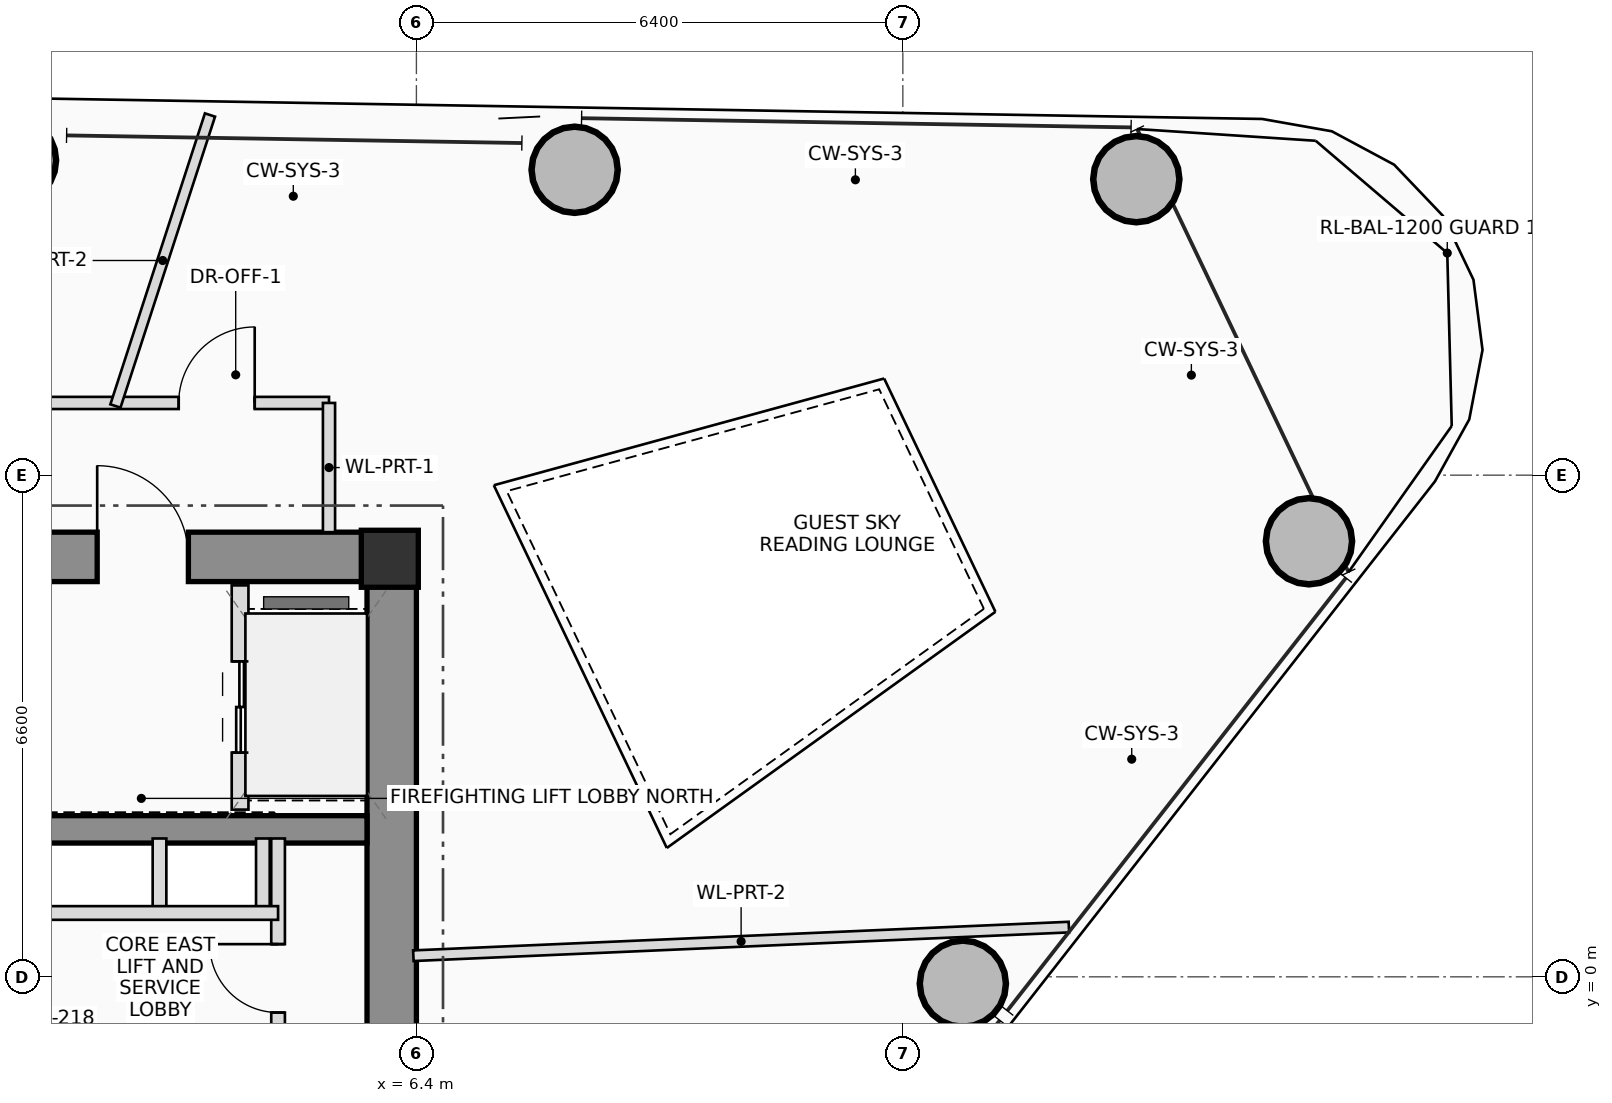
"""IFC4 building model, lengths in metres.
Left out: names, types, materials, properties, quantities, classifications, styles, units other than length and angle.
Written with IfcOpenShell. Run it as: python <this file> out.ifc"""

import sys

from ifc_helpers import new_model, si_unit, direction, frame, frame_2d, origin, origin_2d, place, context, subcontext, project, spatial, rectangle, hollow_circle, extrude, source, transform, mapped, element, fill, save


model = new_model("IFC4")
c1 = context("Model", 3, precision=1e-05, world=origin(), true_north=direction((0.0, 1.0)))
c2 = subcontext(c1, "Body", "Model", "MODEL_VIEW")
j1 = project(units=[si_unit("LENGTHUNIT", "METRE"), si_unit("PLANEANGLEUNIT", "RADIAN")], contexts=[c1])
p1 = place(None, origin())
s1 = spatial("IfcSite", under=j1, at=p1, CompositionType="ELEMENT")
p2 = place(p1, origin())
s2 = spatial("IfcBuilding", under=s1, at=p2, CompositionType="ELEMENT")
p3 = place(p2, frame((0.0, 0.0, 208.7)))
s3 = spatial("IfcBuildingStorey", under=s2, at=p3, CompositionType="ELEMENT", Elevation=208.7)
m1 = source(origin(), c2, "Body", "SweptSolid", [
    extrude(rectangle(XDim=0.75, YDim=0.75, at=origin_2d()), origin(), (0.0, 0.0, 1.0), 3.45),
])
p4 = place(p3, frame((6.05, 5.5, 0.0), z_axis=(0.0, 0.0, 1.0), x_axis=(1.0, 0.0, 0.0)))
e1 = element("IfcColumn", 1, at=p4, inside=s3, PredefinedType="COLUMN", context=c2, shape_type="MappedRepresentation", body=[
    mapped(m1, transform((0.0, 0.0, 0.0), scale=1.0)),
])
p5 = place(p3, frame((-6.4, 5.525, 0.0), z_axis=(0.0, 0.0, 1.0), x_axis=(1.0, 0.0, 0.0)))
e2 = element("IfcWall", 2, at=p5, inside=s3, PredefinedType="SHEAR", context=c2, shape_type="SweptSolid", body=[
    extrude(rectangle(XDim=12.8, YDim=0.65, at=frame_2d((6.4, 0.0))), origin(), (0.0, 0.0, 1.0), 3.45),
])
p6 = place(p5, frame((8.6, 0.0, 0.0)))
e3 = element("IfcOpeningElement", 3, at=p6, cuts=e2, PredefinedType="OPENING", context=c2, shape_type="SweptSolid", body=[
    extrude(rectangle(XDim=1.2, YDim=2.2, at=frame_2d((0.6, 1.1))), frame((0.0, 0.335, 0.0), z_axis=(0.0, -1.0, 0.0), x_axis=(1.0, 0.0, 0.0)), (0.0, 0.0, 1.0), 0.67),
])
p7 = place(p3, frame((6.075, -5.2, 0.0), z_axis=(0.0, 0.0, 1.0), x_axis=(0.0, 1.0, 0.0)))
e4 = element("IfcWall", 4, at=p7, inside=s3, PredefinedType="SHEAR", context=c2, shape_type="SweptSolid", body=[
    extrude(rectangle(XDim=10.4, YDim=0.65, at=frame_2d((5.2, 0.0))), origin(), (0.0, 0.0, 1.0), 3.45),
])
p8 = place(p3, frame((-5.75, 1.94, 0.0), z_axis=(0.0, 0.0, 1.0), x_axis=(1.0, 0.0, 0.0)))
e5 = element("IfcWall", 5, at=p8, inside=s3, PredefinedType="SHEAR", context=c2, shape_type="SweptSolid", body=[
    extrude(rectangle(XDim=11.5, YDim=0.36, at=frame_2d((5.75, 0.0))), origin(), (0.0, 0.0, 1.0), 3.45),
])
m2 = source(origin(), c2, "Body", "SweptSolid", [
    extrude(hollow_circle(Radius=0.575, WallThickness=0.042, at=origin_2d()), origin(), (0.0, 0.0, 1.0), 3.45),
])
for number, where, z_axis, x_axis in (
    (6, (13.59, -0.09, 0.0), (0.0, 0.0, 1.0), (1.0, 0.0, 0.0)),
    (7, (18.144, 5.731, 0.0), (0.0, 0.0, 1.0), (1.0, 0.0, 0.0)),
    (8, (15.872, 10.494, 0.0), (0.0, 0.0, 1.0), (1.0, 0.0, 0.0)),
    (9, (8.482, 10.618, 0.0), (0.0, 0.0, 1.0), (1.0, 0.0, 0.0)),
    (10, (1.092, 10.742, 0.0), (0.0, 0.0, 1.0), (1.0, 0.0, 0.0)),
):
    element("IfcColumn", number, at=place(p3, frame(where, z_axis=z_axis, x_axis=x_axis)), inside=s3, PredefinedType="COLUMN", context=c2, shape_type="MappedRepresentation", body=[
        mapped(m2, transform((0.0, 0.0, 0.0), scale=1.0)),
    ])
p9 = place(p3, frame((4.08, 2.2, 0.0), z_axis=(0.0, 0.0, 1.0), x_axis=(0.0, 1.0, 0.0)))
e11 = element("IfcWall", 11, at=p9, inside=s3, PredefinedType="PLUMBINGWALL", context=c2, shape_type="SweptSolid", body=[
    extrude(rectangle(XDim=2.95, YDim=0.22, at=frame_2d((1.475, 0.0))), origin(), (0.0, 0.0, 1.0), 3.25),
])
p10 = place(p9, frame((0.75, 0.0, 0.0)))
e12 = element("IfcOpeningElement", 12, at=p10, cuts=e11, PredefinedType="OPENING", context=c2, shape_type="SweptSolid", body=[
    extrude(rectangle(XDim=1.2, YDim=2.25, at=frame_2d((0.6, 1.125))), frame((0.0, 0.12, 0.0), z_axis=(0.0, -1.0, 0.0), x_axis=(1.0, 0.0, 0.0)), (0.0, 0.0, 1.0), 0.24),
])
for number, where, z_axis, x_axis in (
    (13, (3.02, 0.84, 0.0), (0.0, 0.0, 1.0), (0.0, 1.0, 0.0)),
    (14, (4.38, 0.84, 0.0), (0.0, 0.0, 1.0), (0.0, 1.0, 0.0)),
):
    element("IfcWall", number, at=place(p3, frame(where, z_axis=z_axis, x_axis=x_axis)), inside=s3, PredefinedType="PLUMBINGWALL", context=c2, shape_type="SweptSolid", body=[
        extrude(rectangle(XDim=0.98, YDim=0.18, at=frame_2d((0.49, 0.0))), origin(), (0.0, 0.0, 1.0), 3.25),
    ])
p11 = place(p3, frame((4.58, -1.82, 0.0), z_axis=(0.0, 0.0, 1.0), x_axis=(0.0, 1.0, 0.0)))
e15 = element("IfcWall", 15, at=p11, inside=s3, PredefinedType="PLUMBINGWALL", context=c2, shape_type="SweptSolid", body=[
    extrude(rectangle(XDim=3.64, YDim=0.18, at=frame_2d((1.82, 0.0))), origin(), (0.0, 0.0, 1.0), 3.25),
])
p12 = place(p11, frame((1.35, 0.0, 0.0)))
e16 = element("IfcOpeningElement", 16, at=p12, cuts=e15, PredefinedType="OPENING", context=c2, shape_type="SweptSolid", body=[
    extrude(rectangle(XDim=0.9, YDim=2.05, at=frame_2d((0.45, 1.025))), frame((0.0, 0.1, 0.0), z_axis=(0.0, -1.0, 0.0), x_axis=(1.0, 0.0, 0.0)), (0.0, 0.0, 1.0), 0.2),
])
p13 = place(p3, frame((-5.68, 0.84, 0.0), z_axis=(0.0, 0.0, 1.0), x_axis=(1.0, 0.0, 0.0)))
e17 = element("IfcWall", 17, at=p13, inside=s3, PredefinedType="PLUMBINGWALL", context=c2, shape_type="SweptSolid", body=[
    extrude(rectangle(XDim=10.26, YDim=0.18, at=frame_2d((5.13, 0.0))), origin(), (0.0, 0.0, 1.0), 3.25),
])
p14 = place(p13, frame((1.08, 0.0, 0.0)))
e18 = element("IfcOpeningElement", 18, at=p14, cuts=e17, PredefinedType="OPENING", context=c2, shape_type="SweptSolid", body=[
    extrude(rectangle(XDim=0.9, YDim=2.05, at=frame_2d((0.45, 1.025))), frame((0.0, 0.1, 0.0), z_axis=(0.0, -1.0, 0.0), x_axis=(1.0, 0.0, 0.0)), (0.0, 0.0, 1.0), 0.2),
])
p15 = place(p13, frame((3.93, 0.0, 0.0)))
e19 = element("IfcOpeningElement", 19, at=p15, cuts=e17, PredefinedType="OPENING", context=c2, shape_type="SweptSolid", body=[
    extrude(rectangle(XDim=1.1, YDim=2.2, at=frame_2d((0.55, 1.1))), frame((0.0, 0.1, 0.0), z_axis=(0.0, -1.0, 0.0), x_axis=(1.0, 0.0, 0.0)), (0.0, 0.0, 1.0), 0.2),
])
p16 = place(p13, frame((5.63, 0.0, 0.0)))
e20 = element("IfcOpeningElement", 20, at=p16, cuts=e17, PredefinedType="OPENING", context=c2, shape_type="SweptSolid", body=[
    extrude(rectangle(XDim=1.1, YDim=2.2, at=frame_2d((0.55, 1.1))), frame((0.0, 0.1, 0.0), z_axis=(0.0, -1.0, 0.0), x_axis=(1.0, 0.0, 0.0)), (0.0, 0.0, 1.0), 0.2),
])
p17 = place(p3, frame((-6.36, 7.55, 0.0), z_axis=(0.0, 0.0, 1.0), x_axis=(1.0, 0.0, 0.0)))
e21 = element("IfcWall", 21, at=p17, inside=s3, PredefinedType="PARTITIONING", context=c2, shape_type="SweptSolid", body=[
    extrude(rectangle(XDim=11.61, YDim=0.16, at=frame_2d((5.805, 0.0))), origin(), (0.0, 0.0, 1.0), 2.605),
])
p18 = place(p17, frame((5.985, 0.0, 0.0)))
e22 = element("IfcOpeningElement", 22, at=p18, cuts=e21, PredefinedType="OPENING", context=c2, shape_type="SweptSolid", body=[
    extrude(rectangle(XDim=1.0, YDim=2.25, at=frame_2d((0.5, 1.125))), frame((0.0, 0.09, 0.0), z_axis=(0.0, -1.0, 0.0), x_axis=(1.0, 0.0, 0.0)), (0.0, 0.0, 1.0), 0.18),
])
p19 = place(p17, frame((9.633, 0.0, 0.0)))
e23 = element("IfcOpeningElement", 23, at=p19, cuts=e21, PredefinedType="OPENING", context=c2, shape_type="SweptSolid", body=[
    extrude(rectangle(XDim=1.0, YDim=2.25, at=frame_2d((0.5, 1.125))), frame((0.0, 0.09, 0.0), z_axis=(0.0, -1.0, 0.0), x_axis=(1.0, 0.0, 0.0)), (0.0, 0.0, 1.0), 0.18),
])
p20 = place(p3, frame((5.25, 7.55, 0.0), z_axis=(0.0, 0.0, 1.0), x_axis=(0.0, -1.0, 0.0)))
e24 = element("IfcWall", 24, at=p20, inside=s3, PredefinedType="PARTITIONING", context=c2, shape_type="SweptSolid", body=[
    extrude(rectangle(XDim=1.7, YDim=0.16, at=frame_2d((0.85, 0.0))), origin(), (0.0, 0.0, 1.0), 2.605),
])
p21 = place(p3, frame((6.36, 0.278, 0.0), z_axis=(0.0, 0.0, 1.0), x_axis=(0.999047440648, 0.043637270025, 0.0)))
e25 = element("IfcWall", 25, at=p21, inside=s3, PredefinedType="PARTITIONING", context=c2, shape_type="SweptSolid", body=[
    extrude(rectangle(XDim=8.633, YDim=0.14, at=frame_2d((4.316, 0.0))), origin(), (0.0, 0.0, 1.0), 2.605),
])
p22 = place(p3, frame((2.44, 7.51, 0.0), z_axis=(0.0, 0.0, 1.0), x_axis=(0.309013387048, 0.951057688379, 0.0)))
e26 = element("IfcWall", 26, at=p22, inside=s3, PredefinedType="PARTITIONING", context=c2, shape_type="SweptSolid", body=[
    extrude(rectangle(XDim=4.025, YDim=0.14, at=frame_2d((2.013, 0.0))), origin(), (0.0, 0.0, 1.0), 2.605),
])
p23 = place(p6, origin())
e27 = element("IfcDoor", 27, at=p23, inside=s3, OperationType="SINGLE_SWING_LEFT", PredefinedType="DOOR", context=c2, shape_type="SweptSolid", body=[
    extrude(rectangle(XDim=1.2, YDim=2.2, at=frame_2d((0.6, 1.1))), frame((0.0, 0.025, 0.0), z_axis=(0.0, -1.0, 0.0), x_axis=(1.0, 0.0, 0.0)), (0.0, 0.0, 1.0), 0.05),
])
fill(e3, e27)
p24 = place(p10, origin())
e28 = element("IfcDoor", 28, at=p24, inside=s3, OperationType="DOUBLE_DOOR_SLIDING", PredefinedType="DOOR", context=c2, shape_type="SweptSolid", body=[
    extrude(rectangle(XDim=1.2, YDim=2.25, at=frame_2d((0.6, 1.125))), frame((0.0, 0.025, 0.0), z_axis=(0.0, -1.0, 0.0), x_axis=(1.0, 0.0, 0.0)), (0.0, 0.0, 1.0), 0.05),
])
fill(e12, e28)
p25 = place(p12, origin())
e29 = element("IfcDoor", 29, at=p25, inside=s3, OperationType="SINGLE_SWING_RIGHT", PredefinedType="DOOR", context=c2, shape_type="SweptSolid", body=[
    extrude(rectangle(XDim=0.9, YDim=2.05, at=frame_2d((0.45, 1.025))), frame((0.0, 0.025, 0.0), z_axis=(0.0, -1.0, 0.0), x_axis=(1.0, 0.0, 0.0)), (0.0, 0.0, 1.0), 0.05),
])
fill(e16, e29)
p26 = place(p19, origin())
e30 = element("IfcDoor", 30, at=p26, inside=s3, OperationType="SINGLE_SWING_RIGHT", PredefinedType="DOOR", context=c2, shape_type="SweptSolid", body=[
    extrude(rectangle(XDim=1.0, YDim=2.25, at=frame_2d((0.5, 1.125))), frame((0.0, 0.025, 0.0), z_axis=(0.0, -1.0, 0.0), x_axis=(1.0, 0.0, 0.0)), (0.0, 0.0, 1.0), 0.05),
])
fill(e23, e30)
save(model, sys.argv[1])
